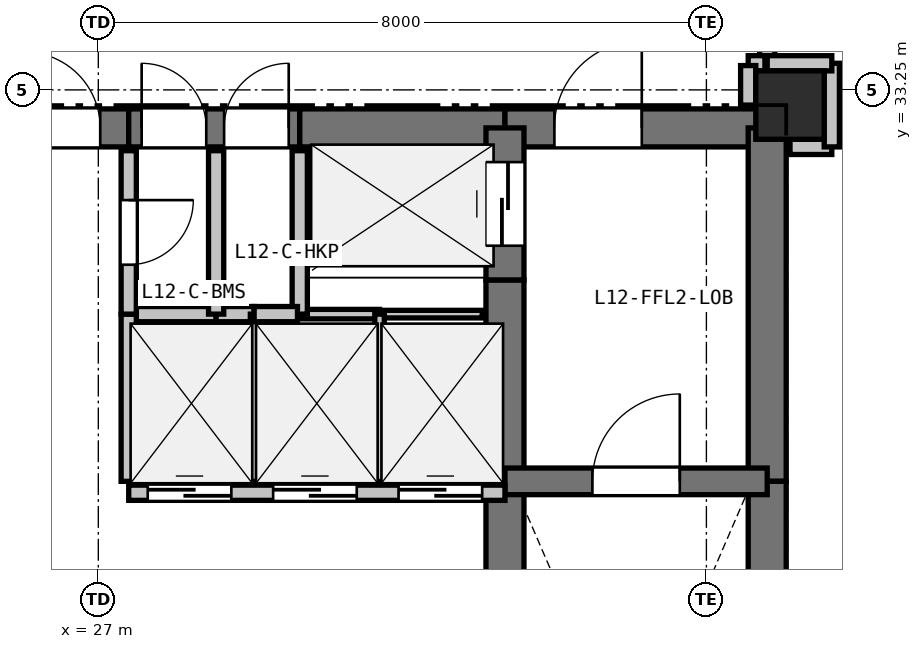
"""IFC4 building model, lengths in metres.
Left out: names, types, materials, properties, quantities, classifications, styles, units other than length and angle.
Written with IfcOpenShell. Run it as: python <this file> out.ifc"""

import sys

from ifc_helpers import new_model, si_unit, direction, frame, frame_2d, origin, origin_2d, place, context, subcontext, project, spatial, rectangle, extrude, element, fill, save


model = new_model("IFC4")
c1 = context("Model", 3, precision=1e-05, world=origin(), true_north=direction((0.0, 1.0)))
c2 = subcontext(c1, "Body", "Model", "MODEL_VIEW")
j1 = project(units=[si_unit("LENGTHUNIT", "METRE"), si_unit("PLANEANGLEUNIT", "RADIAN")], contexts=[c1])
p1 = place(None, origin())
s1 = spatial("IfcSite", under=j1, at=p1, CompositionType="ELEMENT")
p2 = place(p1, origin())
s2 = spatial("IfcBuilding", under=s1, at=p2, CompositionType="ELEMENT")
p3 = place(p2, frame((0.0, 0.0, 45.6)))
s3 = spatial("IfcBuildingStorey", under=s2, at=p3, CompositionType="ELEMENT", Elevation=45.6)
p4 = place(p3, frame((36.1, 33.05, 0.0), z_axis=(0.0, 0.0, 1.0), x_axis=(1.0, 0.0, 0.0)))
e1 = element("IfcColumn", 1, at=p4, inside=s3, PredefinedType="COLUMN", context=c2, shape_type="SweptSolid", body=[
    extrude(rectangle(XDim=0.9, YDim=0.9, at=origin_2d()), origin(), (0.0, 0.0, 1.0), 3.3),
])
p5 = place(p3, frame((25.65, 32.75, 0.0), z_axis=(0.0, 0.0, 1.0), x_axis=(1.0, 0.0, 0.0)))
e2 = element("IfcWall", 2, at=p5, inside=s3, PredefinedType="SHEAR", context=c2, shape_type="SweptSolid", body=[
    extrude(rectangle(XDim=1.75, YDim=0.5, at=frame_2d((0.875, 0.0))), origin(), (0.0, 0.0, 1.0), 3.04),
])
p6 = place(p5, frame((0.375, 0.0, 0.0)))
e3 = element("IfcOpeningElement", 3, at=p6, cuts=e2, PredefinedType="OPENING", context=c2, shape_type="SweptSolid", body=[
    extrude(rectangle(XDim=1.0, YDim=2.15, at=frame_2d((0.5, 1.075))), frame((0.0, 0.26, 0.0), z_axis=(0.0, -1.0, 0.0), x_axis=(1.0, 0.0, 0.0)), (0.0, 0.0, 1.0), 0.52),
])
p7 = place(p3, frame((27.4, 32.75, 0.0), z_axis=(0.0, 0.0, 1.0), x_axis=(1.0, 0.0, 0.0)))
e4 = element("IfcWall", 4, at=p7, inside=s3, PredefinedType="SHEAR", context=c2, shape_type="SweptSolid", body=[
    extrude(rectangle(XDim=2.25, YDim=0.5, at=frame_2d((1.125, 0.0))), origin(), (0.0, 0.0, 1.0), 3.04),
])
p8 = place(p7, frame((0.17, 0.0, 0.0)))
e5 = element("IfcOpeningElement", 5, at=p8, cuts=e4, PredefinedType="OPENING", context=c2, shape_type="SweptSolid", body=[
    extrude(rectangle(XDim=0.85, YDim=2.1, at=frame_2d((0.425, 1.05))), frame((0.0, 0.26, 0.0), z_axis=(0.0, -1.0, 0.0), x_axis=(1.0, 0.0, 0.0)), (0.0, 0.0, 1.0), 0.52),
])
p9 = place(p7, frame((1.255, 0.0, 0.0)))
e6 = element("IfcOpeningElement", 6, at=p9, cuts=e4, PredefinedType="OPENING", context=c2, shape_type="SweptSolid", body=[
    extrude(rectangle(XDim=0.85, YDim=2.1, at=frame_2d((0.425, 1.05))), frame((0.0, 0.26, 0.0), z_axis=(0.0, -1.0, 0.0), x_axis=(1.0, 0.0, 0.0)), (0.0, 0.0, 1.0), 0.52),
])
p10 = place(p3, frame((29.65, 32.75, 0.0), z_axis=(0.0, 0.0, 1.0), x_axis=(1.0, 0.0, 0.0)))
e7 = element("IfcWall", 7, at=p10, inside=s3, PredefinedType="SHEAR", context=c2, shape_type="SweptSolid", body=[
    extrude(rectangle(XDim=2.7, YDim=0.5, at=frame_2d((1.35, 0.0))), origin(), (0.0, 0.0, 1.0), 3.04),
])
p11 = place(p3, frame((32.35, 32.75, 0.0), z_axis=(0.0, 0.0, 1.0), x_axis=(1.0, 0.0, 0.0)))
e8 = element("IfcWall", 8, at=p11, inside=s3, PredefinedType="SHEAR", context=c2, shape_type="SweptSolid", body=[
    extrude(rectangle(XDim=3.45, YDim=0.5, at=frame_2d((1.725, 0.0))), origin(), (0.0, 0.0, 1.0), 3.04),
])
p12 = place(p11, frame((0.65, 0.0, 0.0)))
e9 = element("IfcOpeningElement", 9, at=p12, cuts=e8, PredefinedType="OPENING", context=c2, shape_type="SweptSolid", body=[
    extrude(rectangle(XDim=1.15, YDim=2.15, at=frame_2d((0.575, 1.075))), frame((0.0, 0.26, 0.0), z_axis=(0.0, -1.0, 0.0), x_axis=(1.0, 0.0, 0.0)), (0.0, 0.0, 1.0), 0.52),
])
p13 = place(p3, frame((35.8, 32.75, 0.0), z_axis=(0.0, 0.0, 1.0), x_axis=(0.0, -1.0, 0.0)))
e10 = element("IfcWall", 10, at=p13, inside=s3, PredefinedType="SHEAR", context=c2, shape_type="SweptSolid", body=[
    extrude(rectangle(XDim=4.65, YDim=0.5, at=frame_2d((2.325, 0.0))), origin(), (0.0, 0.0, 1.0), 3.04),
])
p14 = place(p3, frame((35.8, 28.1, 0.0), z_axis=(0.0, 0.0, 1.0), x_axis=(0.0, -1.0, 0.0)))
e11 = element("IfcWall", 11, at=p14, inside=s3, PredefinedType="SHEAR", context=c2, shape_type="SweptSolid", body=[
    extrude(rectangle(XDim=7.35, YDim=0.5, at=frame_2d((3.675, 0.0))), origin(), (0.0, 0.0, 1.0), 3.04),
])
p15 = place(p3, frame((32.35, 25.55, 0.0), z_axis=(0.0, 0.0, 1.0), x_axis=(0.0, 1.0, 0.0)))
e12 = element("IfcWall", 12, at=p15, inside=s3, PredefinedType="SHEAR", context=c2, shape_type="SweptSolid", body=[
    extrude(rectangle(XDim=2.4, YDim=0.5, at=frame_2d((1.2, 0.0))), origin(), (0.0, 0.0, 1.0), 3.04),
])
p16 = place(p3, frame((32.35, 27.95, 0.0), z_axis=(0.0, 0.0, 1.0), x_axis=(0.0, 1.0, 0.0)))
e13 = element("IfcWall", 13, at=p16, inside=s3, PredefinedType="SHEAR", context=c2, shape_type="SweptSolid", body=[
    extrude(rectangle(XDim=2.8, YDim=0.5, at=frame_2d((1.4, 0.0))), origin(), (0.0, 0.0, 1.0), 3.04),
])
p17 = place(p3, frame((32.35, 30.75, 0.0), z_axis=(0.0, 0.0, 1.0), x_axis=(0.0, 1.0, 0.0)))
e14 = element("IfcWall", 14, at=p17, inside=s3, PredefinedType="SHEAR", context=c2, shape_type="SweptSolid", body=[
    extrude(rectangle(XDim=2.0, YDim=0.5, at=frame_2d((1.0, 0.0))), origin(), (0.0, 0.0, 1.0), 3.04),
])
p18 = place(p17, frame((0.45, 0.0, 0.0)))
e15 = element("IfcOpeningElement", 15, at=p18, cuts=e14, PredefinedType="OPENING", context=c2, shape_type="SweptSolid", body=[
    extrude(rectangle(XDim=1.1, YDim=2.15, at=frame_2d((0.55, 1.075))), frame((0.0, 0.26, 0.0), z_axis=(0.0, -1.0, 0.0), x_axis=(1.0, 0.0, 0.0)), (0.0, 0.0, 1.0), 0.52),
])
p19 = place(p3, frame((32.35, 28.1, 0.0), z_axis=(0.0, 0.0, 1.0), x_axis=(1.0, 0.0, 0.0)))
e16 = element("IfcWall", 16, at=p19, inside=s3, PredefinedType="SHEAR", context=c2, shape_type="SweptSolid", body=[
    extrude(rectangle(XDim=3.45, YDim=0.35, at=frame_2d((1.725, 0.0))), origin(), (0.0, 0.0, 1.0), 3.04),
])
p20 = place(p19, frame((1.15, 0.0, 0.0)))
e17 = element("IfcOpeningElement", 17, at=p20, cuts=e16, PredefinedType="OPENING", context=c2, shape_type="SweptSolid", body=[
    extrude(rectangle(XDim=1.15, YDim=2.15, at=frame_2d((0.575, 1.075))), frame((0.0, 0.185, 0.0), z_axis=(0.0, -1.0, 0.0), x_axis=(1.0, 0.0, 0.0)), (0.0, 0.0, 1.0), 0.37),
])
p21 = place(p3, frame((27.4, 27.95, 0.0), z_axis=(0.0, 0.0, 1.0), x_axis=(1.0, 0.0, 0.0)))
e18 = element("IfcWall", 18, at=p21, inside=s3, PredefinedType="PARTITIONING", context=c2, shape_type="SweptSolid", body=[
    extrude(rectangle(XDim=4.95, YDim=0.2, at=frame_2d((2.475, 0.0))), origin(), (0.0, 0.0, 1.0), 3.04),
])
p22 = place(p21, frame((0.25, 0.0, 0.0)))
e19 = element("IfcOpeningElement", 19, at=p22, cuts=e18, PredefinedType="OPENING", context=c2, shape_type="SweptSolid", body=[
    extrude(rectangle(XDim=1.1, YDim=2.15, at=frame_2d((0.55, 1.075))), frame((0.0, 0.11, 0.0), z_axis=(0.0, -1.0, 0.0), x_axis=(1.0, 0.0, 0.0)), (0.0, 0.0, 1.0), 0.22),
])
p23 = place(p21, frame((1.9, 0.0, 0.0)))
e20 = element("IfcOpeningElement", 20, at=p23, cuts=e18, PredefinedType="OPENING", context=c2, shape_type="SweptSolid", body=[
    extrude(rectangle(XDim=1.1, YDim=2.15, at=frame_2d((0.55, 1.075))), frame((0.0, 0.11, 0.0), z_axis=(0.0, -1.0, 0.0), x_axis=(1.0, 0.0, 0.0)), (0.0, 0.0, 1.0), 0.22),
])
p24 = place(p21, frame((3.55, 0.0, 0.0)))
e21 = element("IfcOpeningElement", 21, at=p24, cuts=e18, PredefinedType="OPENING", context=c2, shape_type="SweptSolid", body=[
    extrude(rectangle(XDim=1.1, YDim=2.15, at=frame_2d((0.55, 1.075))), frame((0.0, 0.11, 0.0), z_axis=(0.0, -1.0, 0.0), x_axis=(1.0, 0.0, 0.0)), (0.0, 0.0, 1.0), 0.22),
])
p25 = place(p3, frame((32.05, 30.3, 0.0), z_axis=(0.0, 0.0, 1.0), x_axis=(-1.0, 0.0, 0.0)))
e22 = element("IfcWall", 22, at=p25, inside=s3, PredefinedType="PARTITIONING", context=c2, shape_type="SweptSolid", body=[
    extrude(rectangle(XDim=1.35, YDim=0.1, at=frame_2d((0.675, 0.0))), origin(), (0.0, 0.0, 1.0), 3.04),
])
p26 = place(p3, frame((30.7, 30.3, 0.0), z_axis=(0.0, 0.0, 1.0), x_axis=(-1.0, 0.0, 0.0)))
e23 = element("IfcWall", 23, at=p26, inside=s3, PredefinedType="PARTITIONING", context=c2, shape_type="SweptSolid", body=[
    extrude(rectangle(XDim=1.05, YDim=0.125, at=frame_2d((0.525, 0.0))), origin(), (0.0, 0.0, 1.0), 3.04),
])
p27 = place(p3, frame((29.65, 30.3, 0.0), z_axis=(0.0, 0.0, 1.0), x_axis=(0.0, 1.0, 0.0)))
e24 = element("IfcWall", 24, at=p27, inside=s3, PredefinedType="PARTITIONING", context=c2, shape_type="SweptSolid", body=[
    extrude(rectangle(XDim=2.15, YDim=0.2, at=frame_2d((1.075, 0.0))), origin(), (0.0, 0.0, 1.0), 3.04),
])
p28 = place(p3, frame((27.4, 30.3, 0.0), z_axis=(0.0, 0.0, 1.0), x_axis=(1.0, 0.0, 0.0)))
e25 = element("IfcWall", 25, at=p28, inside=s3, PredefinedType="PARTITIONING", context=c2, shape_type="SweptSolid", body=[
    extrude(rectangle(XDim=1.15, YDim=0.2, at=frame_2d((0.575, 0.0))), origin(), (0.0, 0.0, 1.0), 3.04),
])
p29 = place(p3, frame((28.55, 30.3, 0.0), z_axis=(0.0, 0.0, 1.0), x_axis=(1.0, 0.0, 0.0)))
e26 = element("IfcWall", 26, at=p29, inside=s3, PredefinedType="PARTITIONING", context=c2, shape_type="SweptSolid", body=[
    extrude(rectangle(XDim=0.5, YDim=0.2, at=frame_2d((0.25, 0.0))), origin(), (0.0, 0.0, 1.0), 3.04),
])
p30 = place(p3, frame((29.05, 30.3, 0.0), z_axis=(0.0, 0.0, 1.0), x_axis=(0.0, -1.0, 0.0)))
e27 = element("IfcWall", 27, at=p30, inside=s3, PredefinedType="PARTITIONING", context=c2, shape_type="SweptSolid", body=[
    extrude(rectangle(XDim=2.2, YDim=0.1, at=frame_2d((1.1, 0.0))), origin(), (0.0, 0.0, 1.0), 3.04),
])
p31 = place(p3, frame((27.4, 28.1, 0.0), z_axis=(0.0, 0.0, 1.0), x_axis=(0.0, 1.0, 0.0)))
e28 = element("IfcWall", 28, at=p31, inside=s3, PredefinedType="PARTITIONING", context=c2, shape_type="SweptSolid", body=[
    extrude(rectangle(XDim=2.2, YDim=0.2, at=frame_2d((1.1, 0.0))), origin(), (0.0, 0.0, 1.0), 3.04),
])
p32 = place(p3, frame((29.05, 30.3, 0.0), z_axis=(0.0, 0.0, 1.0), x_axis=(1.0, 0.0, 0.0)))
e29 = element("IfcWall", 29, at=p32, inside=s3, PredefinedType="PARTITIONING", context=c2, shape_type="SweptSolid", body=[
    extrude(rectangle(XDim=0.57, YDim=0.2, at=frame_2d((0.285, 0.0))), origin(), (0.0, 0.0, 1.0), 3.04),
])
p33 = place(p3, frame((30.7, 30.3, 0.0), z_axis=(0.0, 0.0, 1.0), x_axis=(0.0, -1.0, 0.0)))
e30 = element("IfcWall", 30, at=p33, inside=s3, PredefinedType="PARTITIONING", context=c2, shape_type="SweptSolid", body=[
    extrude(rectangle(XDim=2.2, YDim=0.125, at=frame_2d((1.1, 0.0))), origin(), (0.0, 0.0, 1.0), 3.04),
])
p34 = place(p3, frame((27.4, 32.45, 0.0), z_axis=(0.0, 0.0, 1.0), x_axis=(0.0, -1.0, 0.0)))
e31 = element("IfcWall", 31, at=p34, inside=s3, PredefinedType="PARTITIONING", context=c2, shape_type="SweptSolid", body=[
    extrude(rectangle(XDim=2.15, YDim=0.2, at=frame_2d((1.075, 0.0))), origin(), (0.0, 0.0, 1.0), 3.04),
])
p35 = place(p34, frame((0.65, 0.0, 0.0)))
e32 = element("IfcOpeningElement", 32, at=p35, cuts=e31, PredefinedType="OPENING", context=c2, shape_type="SweptSolid", body=[
    extrude(rectangle(XDim=0.85, YDim=2.1, at=frame_2d((0.425, 1.05))), frame((0.0, 0.11, 0.0), z_axis=(0.0, -1.0, 0.0), x_axis=(1.0, 0.0, 0.0)), (0.0, 0.0, 1.0), 0.22),
])
p36 = place(p3, frame((35.8, 35.35, 0.0), z_axis=(0.0, 0.0, 1.0), x_axis=(0.0, -1.0, 0.0)))
e33 = element("IfcWall", 33, at=p36, inside=s3, PredefinedType="PARTITIONING", context=c2, shape_type="SweptSolid", body=[
    extrude(rectangle(XDim=1.75, YDim=0.2, at=frame_2d((0.875, 0.0))), origin(), (0.0, 0.0, 1.0), 3.04),
])
p37 = place(p36, frame((0.375, 0.0, 0.0)))
e34 = element("IfcOpeningElement", 34, at=p37, cuts=e33, PredefinedType="OPENING", context=c2, shape_type="SweptSolid", body=[
    extrude(rectangle(XDim=1.0, YDim=2.15, at=frame_2d((0.5, 1.075))), frame((0.0, 0.11, 0.0), z_axis=(0.0, -1.0, 0.0), x_axis=(1.0, 0.0, 0.0)), (0.0, 0.0, 1.0), 0.22),
])
p38 = place(p3, frame((35.77, 33.6, 0.0), z_axis=(0.0, 0.0, 1.0), x_axis=(-1.0, 0.0, 0.0)))
e35 = element("IfcWall", 35, at=p38, inside=s3, PredefinedType="PARTITIONING", context=c2, shape_type="SweptSolid", body=[
    extrude(rectangle(XDim=0.22, YDim=0.2, at=frame_2d((0.11, 0.0))), origin(), (0.0, 0.0, 1.0), 3.04),
])
p39 = place(p3, frame((35.55, 33.57, 0.0), z_axis=(0.0, 0.0, 1.0), x_axis=(0.0, -1.0, 0.0)))
e36 = element("IfcWall", 36, at=p39, inside=s3, PredefinedType="PARTITIONING", context=c2, shape_type="SweptSolid", body=[
    extrude(rectangle(XDim=0.52, YDim=0.2, at=frame_2d((0.26, 0.0))), origin(), (0.0, 0.0, 1.0), 2.488),
])
p40 = place(p3, frame((36.1, 32.5, 0.0), z_axis=(0.0, 0.0, 1.0), x_axis=(1.0, 0.0, 0.0)))
e37 = element("IfcWall", 37, at=p40, inside=s3, PredefinedType="PARTITIONING", context=c2, shape_type="SweptSolid", body=[
    extrude(rectangle(XDim=0.55, YDim=0.2, at=frame_2d((0.275, 0.0))), origin(), (0.0, 0.0, 1.0), 2.488),
])
p41 = place(p3, frame((36.65, 32.5, 0.0), z_axis=(0.0, 0.0, 1.0), x_axis=(0.0, 1.0, 0.0)))
e38 = element("IfcWall", 38, at=p41, inside=s3, PredefinedType="PARTITIONING", context=c2, shape_type="SweptSolid", body=[
    extrude(rectangle(XDim=1.1, YDim=0.2, at=frame_2d((0.55, 0.0))), origin(), (0.0, 0.0, 1.0), 2.337),
])
p42 = place(p3, frame((36.65, 33.6, 0.0), z_axis=(0.0, 0.0, 1.0), x_axis=(-1.0, 0.0, 0.0)))
e39 = element("IfcWall", 39, at=p42, inside=s3, PredefinedType="PARTITIONING", context=c2, shape_type="SweptSolid", body=[
    extrude(rectangle(XDim=0.85, YDim=0.2, at=frame_2d((0.425, 0.0))), origin(), (0.0, 0.0, 1.0), 2.337),
])
p43 = place(p3, frame((28.55, 32.45, 0.0), z_axis=(0.0, 0.0, 1.0), x_axis=(0.0, -1.0, 0.0)))
e40 = element("IfcWall", 40, at=p43, inside=s3, PredefinedType="PARTITIONING", context=c2, shape_type="SweptSolid", body=[
    extrude(rectangle(XDim=2.15, YDim=0.2, at=frame_2d((1.075, 0.0))), origin(), (0.0, 0.0, 1.0), 3.04),
])
p44 = place(p22, origin())
e41 = element("IfcDoor", 41, at=p44, inside=s3, OperationType="SLIDING_TO_LEFT", PredefinedType="DOOR", context=c2, shape_type="SweptSolid", body=[
    extrude(rectangle(XDim=1.1, YDim=2.15, at=frame_2d((0.55, 1.075))), frame((0.0, 0.025, 0.0), z_axis=(0.0, -1.0, 0.0), x_axis=(1.0, 0.0, 0.0)), (0.0, 0.0, 1.0), 0.05),
])
fill(e19, e41)
p45 = place(p23, origin())
e42 = element("IfcDoor", 42, at=p45, inside=s3, OperationType="SLIDING_TO_LEFT", PredefinedType="DOOR", context=c2, shape_type="SweptSolid", body=[
    extrude(rectangle(XDim=1.1, YDim=2.15, at=frame_2d((0.55, 1.075))), frame((0.0, 0.025, 0.0), z_axis=(0.0, -1.0, 0.0), x_axis=(1.0, 0.0, 0.0)), (0.0, 0.0, 1.0), 0.05),
])
fill(e20, e42)
p46 = place(p24, origin())
e43 = element("IfcDoor", 43, at=p46, inside=s3, OperationType="SLIDING_TO_LEFT", PredefinedType="DOOR", context=c2, shape_type="SweptSolid", body=[
    extrude(rectangle(XDim=1.1, YDim=2.15, at=frame_2d((0.55, 1.075))), frame((0.0, 0.025, 0.0), z_axis=(0.0, -1.0, 0.0), x_axis=(1.0, 0.0, 0.0)), (0.0, 0.0, 1.0), 0.05),
])
fill(e21, e43)
p47 = place(p6, origin())
e44 = element("IfcDoor", 44, at=p47, inside=s3, OperationType="SINGLE_SWING_LEFT", PredefinedType="DOOR", context=c2, shape_type="SweptSolid", body=[
    extrude(rectangle(XDim=1.0, YDim=2.15, at=frame_2d((0.5, 1.075))), frame((0.0, 0.025, 0.0), z_axis=(0.0, -1.0, 0.0), x_axis=(1.0, 0.0, 0.0)), (0.0, 0.0, 1.0), 0.05),
])
fill(e3, e44)
p48 = place(p18, origin())
e45 = element("IfcDoor", 45, at=p48, inside=s3, OperationType="SLIDING_TO_LEFT", PredefinedType="DOOR", context=c2, shape_type="SweptSolid", body=[
    extrude(rectangle(XDim=1.1, YDim=2.15, at=frame_2d((0.55, 1.075))), frame((0.0, 0.025, 0.0), z_axis=(0.0, -1.0, 0.0), x_axis=(1.0, 0.0, 0.0)), (0.0, 0.0, 1.0), 0.05),
])
fill(e15, e45)
p49 = place(p20, origin())
e46 = element("IfcDoor", 46, at=p49, inside=s3, OperationType="SINGLE_SWING_RIGHT", PredefinedType="DOOR", context=c2, shape_type="SweptSolid", body=[
    extrude(rectangle(XDim=1.15, YDim=2.15, at=frame_2d((0.575, 1.075))), frame((0.0, 0.025, 0.0), z_axis=(0.0, -1.0, 0.0), x_axis=(1.0, 0.0, 0.0)), (0.0, 0.0, 1.0), 0.05),
])
fill(e17, e46)
p50 = place(p12, origin())
e47 = element("IfcDoor", 47, at=p50, inside=s3, OperationType="SINGLE_SWING_RIGHT", PredefinedType="DOOR", context=c2, shape_type="SweptSolid", body=[
    extrude(rectangle(XDim=1.15, YDim=2.15, at=frame_2d((0.575, 1.075))), frame((0.0, 0.025, 0.0), z_axis=(0.0, -1.0, 0.0), x_axis=(1.0, 0.0, 0.0)), (0.0, 0.0, 1.0), 0.05),
])
fill(e9, e47)
p51 = place(p35, origin())
e48 = element("IfcDoor", 48, at=p51, inside=s3, OperationType="SINGLE_SWING_LEFT", PredefinedType="DOOR", context=c2, shape_type="SweptSolid", body=[
    extrude(rectangle(XDim=0.85, YDim=2.1, at=frame_2d((0.425, 1.05))), frame((0.0, 0.025, 0.0), z_axis=(0.0, -1.0, 0.0), x_axis=(1.0, 0.0, 0.0)), (0.0, 0.0, 1.0), 0.05),
])
fill(e32, e48)
p52 = place(p8, origin())
e49 = element("IfcDoor", 49, at=p52, inside=s3, OperationType="SINGLE_SWING_LEFT", PredefinedType="DOOR", context=c2, shape_type="SweptSolid", body=[
    extrude(rectangle(XDim=0.85, YDim=2.1, at=frame_2d((0.425, 1.05))), frame((0.0, 0.025, 0.0), z_axis=(0.0, -1.0, 0.0), x_axis=(1.0, 0.0, 0.0)), (0.0, 0.0, 1.0), 0.05),
])
fill(e5, e49)
p53 = place(p9, origin())
e50 = element("IfcDoor", 50, at=p53, inside=s3, OperationType="SINGLE_SWING_RIGHT", PredefinedType="DOOR", context=c2, shape_type="SweptSolid", body=[
    extrude(rectangle(XDim=0.85, YDim=2.1, at=frame_2d((0.425, 1.05))), frame((0.0, 0.025, 0.0), z_axis=(0.0, -1.0, 0.0), x_axis=(1.0, 0.0, 0.0)), (0.0, 0.0, 1.0), 0.05),
])
fill(e6, e50)
save(model, sys.argv[1])
